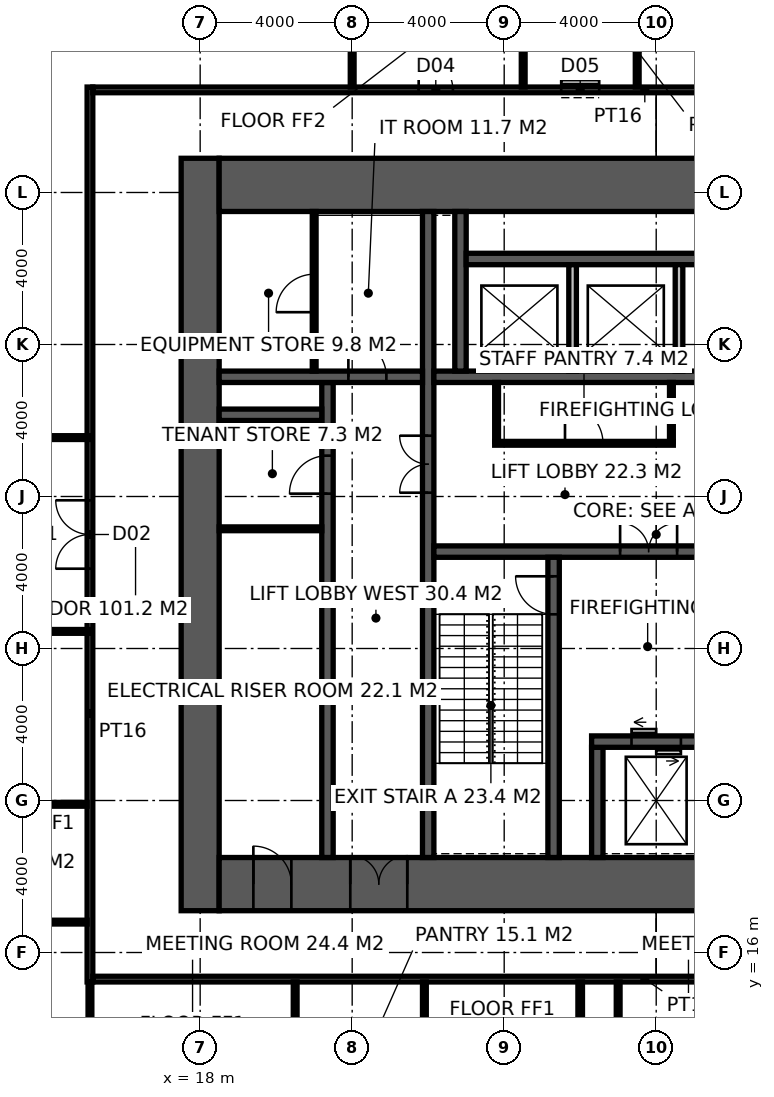
"""IFC4 building model, lengths in metres.
Left out: names, types, materials, properties, quantities, classifications, styles, units other than length and angle.
Written with IfcOpenShell. Run it as: python <this file> out.ifc"""

import sys

from ifc_helpers import new_model, si_unit, direction, frame, frame_2d, origin, place, context, subcontext, project, spatial, rectangle, extrude, element, fill, save


model = new_model("IFC4")
c1 = context("Model", 3, precision=1e-05, world=origin(), true_north=direction((0.0, 1.0)))
c2 = subcontext(c1, "Body", "Model", "MODEL_VIEW")
j1 = project(units=[si_unit("LENGTHUNIT", "METRE"), si_unit("PLANEANGLEUNIT", "RADIAN")], contexts=[c1])
p1 = place(None, origin())
s1 = spatial("IfcSite", under=j1, at=p1, CompositionType="ELEMENT")
p2 = place(p1, origin())
s2 = spatial("IfcBuilding", under=s1, at=p2, CompositionType="ELEMENT")
p3 = place(p2, frame((0.0, 0.0, 6.0)))
s3 = spatial("IfcBuildingStorey", under=s2, at=p3, CompositionType="ELEMENT", Elevation=6.0)
p4 = place(p3, frame((18.0, 17.1, -0.15), z_axis=(0.0, 0.0, 1.0), x_axis=(0.0, 1.0, 0.0)))
e1 = element("IfcWall", 1, at=p4, inside=s3, PredefinedType="SHEAR", context=c2, shape_type="SweptSolid", body=[
    extrude(rectangle(XDim=19.8, YDim=1.0, at=frame_2d((9.9, 0.0))), origin(), (0.0, 0.0, 1.0), 5.0),
])
p5 = place(p3, frame((18.5, 17.8, -0.15), z_axis=(0.0, 0.0, 1.0), x_axis=(1.0, 0.0, 0.0)))
e2 = element("IfcWall", 2, at=p5, inside=s3, PredefinedType="SHEAR", context=c2, shape_type="SweptSolid", body=[
    extrude(rectangle(XDim=23.0, YDim=1.4, at=frame_2d((11.5, 0.0))), origin(), (0.0, 0.0, 1.0), 5.0),
])
p6 = place(p5, frame((3.45, 0.0, 0.15)))
e3 = element("IfcOpeningElement", 3, at=p6, cuts=e2, PredefinedType="OPENING", context=c2, shape_type="SweptSolid", body=[
    extrude(rectangle(XDim=1.5, YDim=2.4, at=frame_2d((0.75, 1.2))), frame((0.0, 0.71, 0.0), z_axis=(0.0, -1.0, 0.0), x_axis=(1.0, 0.0, 0.0)), (0.0, 0.0, 1.0), 1.42),
])
p7 = place(p5, frame((17.9, 0.0, 0.15)))
e4 = element("IfcOpeningElement", 4, at=p7, cuts=e2, PredefinedType="OPENING", context=c2, shape_type="SweptSolid", body=[
    extrude(rectangle(XDim=1.5, YDim=2.4, at=frame_2d((0.75, 1.2))), frame((0.0, 0.71, 0.0), z_axis=(0.0, -1.0, 0.0), x_axis=(1.0, 0.0, 0.0)), (0.0, 0.0, 1.0), 1.42),
])
p8 = place(p5, frame((0.9, 0.0, 0.15)))
e5 = element("IfcOpeningElement", 5, at=p8, cuts=e2, PredefinedType="OPENING", context=c2, shape_type="SweptSolid", body=[
    extrude(rectangle(XDim=1.0, YDim=2.2, at=frame_2d((0.5, 1.1))), frame((0.0, 0.71, 0.0), z_axis=(0.0, -1.0, 0.0), x_axis=(1.0, 0.0, 0.0)), (0.0, 0.0, 1.0), 1.42),
])
p9 = place(p3, frame((18.5, 36.2, -0.15), z_axis=(0.0, 0.0, 1.0), x_axis=(1.0, 0.0, 0.0)))
e6 = element("IfcWall", 6, at=p9, inside=s3, PredefinedType="SHEAR", context=c2, shape_type="SweptSolid", body=[
    extrude(rectangle(XDim=23.0, YDim=1.4, at=frame_2d((11.5, 0.0))), origin(), (0.0, 0.0, 1.0), 5.0),
])
p10 = place(p3, frame((24.0, 18.5, -0.15), z_axis=(0.0, 0.0, 1.0), x_axis=(0.0, 1.0, 0.0)))
e7 = element("IfcWall", 7, at=p10, inside=s3, PredefinedType="SHEAR", context=c2, shape_type="SweptSolid", body=[
    extrude(rectangle(XDim=17.0, YDim=0.3, at=frame_2d((8.5, 0.0))), origin(), (0.0, 0.0, 1.0), 5.0),
])
p11 = place(p10, frame((9.6, 0.0, 0.15)))
e8 = element("IfcOpeningElement", 8, at=p11, cuts=e7, PredefinedType="OPENING", context=c2, shape_type="SweptSolid", body=[
    extrude(rectangle(XDim=1.5, YDim=2.4, at=frame_2d((0.75, 1.2))), frame((0.0, 0.16, 0.0), z_axis=(0.0, -1.0, 0.0), x_axis=(1.0, 0.0, 0.0)), (0.0, 0.0, 1.0), 0.32),
])
p12 = place(p3, frame((24.15, 26.55, -0.15), z_axis=(0.0, 0.0, 1.0), x_axis=(1.0, 0.0, 0.0)))
e9 = element("IfcWall", 9, at=p12, inside=s3, PredefinedType="SHEAR", context=c2, shape_type="SweptSolid", body=[
    extrude(rectangle(XDim=11.25, YDim=0.3, at=frame_2d((5.625, 0.0))), origin(), (0.0, 0.0, 1.0), 5.0),
])
p13 = place(p12, frame((9.25, 0.0, 0.15)))
e10 = element("IfcOpeningElement", 10, at=p13, cuts=e9, PredefinedType="OPENING", context=c2, shape_type="SweptSolid", body=[
    extrude(rectangle(XDim=1.0, YDim=2.2, at=frame_2d((0.5, 1.1))), frame((0.0, 0.16, 0.0), z_axis=(0.0, -1.0, 0.0), x_axis=(1.0, 0.0, 0.0)), (0.0, 0.0, 1.0), 0.32),
])
p14 = place(p12, frame((4.9, 0.0, 0.15)))
e11 = element("IfcOpeningElement", 11, at=p14, cuts=e9, PredefinedType="OPENING", context=c2, shape_type="SweptSolid", body=[
    extrude(rectangle(XDim=1.5, YDim=2.4, at=frame_2d((0.75, 1.2))), frame((0.0, 0.16, 0.0), z_axis=(0.0, -1.0, 0.0), x_axis=(1.0, 0.0, 0.0)), (0.0, 0.0, 1.0), 0.32),
])
p15 = place(p3, frame((27.3, 18.5, -0.15), z_axis=(0.0, 0.0, 1.0), x_axis=(0.0, 1.0, 0.0)))
e12 = element("IfcWall", 12, at=p15, inside=s3, PredefinedType="SHEAR", context=c2, shape_type="SweptSolid", body=[
    extrude(rectangle(XDim=7.9, YDim=0.3, at=frame_2d((3.95, 0.0))), origin(), (0.0, 0.0, 1.0), 5.0),
])
p16 = place(p15, frame((6.4, 0.0, 0.15)))
e13 = element("IfcOpeningElement", 13, at=p16, cuts=e12, PredefinedType="OPENING", context=c2, shape_type="SweptSolid", body=[
    extrude(rectangle(XDim=1.0, YDim=2.2, at=frame_2d((0.5, 1.1))), frame((0.0, 0.16, 0.0), z_axis=(0.0, -1.0, 0.0), x_axis=(1.0, 0.0, 0.0)), (0.0, 0.0, 1.0), 0.32),
])
p17 = place(p3, frame((28.45, 18.5, -0.15), z_axis=(0.0, 0.0, 1.0), x_axis=(0.0, 1.0, 0.0)))
e14 = element("IfcWall", 14, at=p17, inside=s3, PredefinedType="SHEAR", context=c2, shape_type="SweptSolid", body=[
    extrude(rectangle(XDim=2.9, YDim=0.3, at=frame_2d((1.45, 0.0))), origin(), (0.0, 0.0, 1.0), 5.0),
])
p18 = place(p3, frame((28.3, 21.55, -0.15), z_axis=(0.0, 0.0, 1.0), x_axis=(1.0, 0.0, 0.0)))
e15 = element("IfcWall", 15, at=p18, inside=s3, PredefinedType="SHEAR", context=c2, shape_type="SweptSolid", body=[
    extrude(rectangle(XDim=3.8, YDim=0.3, at=frame_2d((1.9, 0.0))), origin(), (0.0, 0.0, 1.0), 5.0),
])
p19 = place(p18, frame((1.05, 0.0, 0.15)))
e16 = element("IfcOpeningElement", 16, at=p19, cuts=e15, PredefinedType="OPENING", context=c2, shape_type="SweptSolid", body=[
    extrude(rectangle(XDim=1.3, YDim=2.4, at=frame_2d((0.65, 1.2))), frame((0.0, 0.16, 0.0), z_axis=(0.0, -1.0, 0.0), x_axis=(1.0, 0.0, 0.0)), (0.0, 0.0, 1.0), 0.32),
])
p20 = place(p3, frame((24.15, 31.15, -0.15), z_axis=(0.0, 0.0, 1.0), x_axis=(1.0, 0.0, 0.0)))
e17 = element("IfcWall", 17, at=p20, inside=s3, PredefinedType="SHEAR", context=c2, shape_type="SweptSolid", body=[
    extrude(rectangle(XDim=11.25, YDim=0.3, at=frame_2d((5.625, 0.0))), origin(), (0.0, 0.0, 1.0), 5.0),
])
p21 = place(p20, frame((7.25, 0.0, 0.15)))
e18 = element("IfcOpeningElement", 18, at=p21, cuts=e17, PredefinedType="OPENING", context=c2, shape_type="SweptSolid", body=[
    extrude(rectangle(XDim=1.4, YDim=2.4, at=frame_2d((0.7, 1.2))), frame((0.0, 0.16, 0.0), z_axis=(0.0, -1.0, 0.0), x_axis=(1.0, 0.0, 0.0)), (0.0, 0.0, 1.0), 0.32),
])
p22 = place(p3, frame((21.35, 18.5, -0.15), z_axis=(0.0, 0.0, 1.0), x_axis=(0.0, 1.0, 0.0)))
e19 = element("IfcWall", 19, at=p22, inside=s3, PredefinedType="SHEAR", context=c2, shape_type="SweptSolid", body=[
    extrude(rectangle(XDim=12.5, YDim=0.3, at=frame_2d((6.25, 0.0))), origin(), (0.0, 0.0, 1.0), 5.0),
])
p23 = place(p22, frame((9.575, 0.0, 0.15)))
e20 = element("IfcOpeningElement", 20, at=p23, cuts=e19, PredefinedType="OPENING", context=c2, shape_type="SweptSolid", body=[
    extrude(rectangle(XDim=1.0, YDim=2.2, at=frame_2d((0.5, 1.1))), frame((0.0, 0.16, 0.0), z_axis=(0.0, -1.0, 0.0), x_axis=(1.0, 0.0, 0.0)), (0.0, 0.0, 1.0), 0.32),
])
p24 = place(p3, frame((18.5, 31.15, -0.15), z_axis=(0.0, 0.0, 1.0), x_axis=(1.0, 0.0, 0.0)))
e21 = element("IfcWall", 21, at=p24, inside=s3, PredefinedType="SHEAR", context=c2, shape_type="SweptSolid", body=[
    extrude(rectangle(XDim=5.35, YDim=0.3, at=frame_2d((2.675, 0.0))), origin(), (0.0, 0.0, 1.0), 5.0),
])
p25 = place(p24, frame((3.4, 0.0, 0.15)))
e22 = element("IfcOpeningElement", 22, at=p25, cuts=e21, PredefinedType="OPENING", context=c2, shape_type="SweptSolid", body=[
    extrude(rectangle(XDim=1.0, YDim=2.2, at=frame_2d((0.5, 1.1))), frame((0.0, 0.16, 0.0), z_axis=(0.0, -1.0, 0.0), x_axis=(1.0, 0.0, 0.0)), (0.0, 0.0, 1.0), 0.32),
])
p26 = place(p3, frame((18.5, 30.15, -0.15), z_axis=(0.0, 0.0, 1.0), x_axis=(1.0, 0.0, 0.0)))
e23 = element("IfcWall", 23, at=p26, inside=s3, PredefinedType="SHEAR", context=c2, shape_type="SweptSolid", body=[
    extrude(rectangle(XDim=2.7, YDim=0.3, at=frame_2d((1.35, 0.0))), origin(), (0.0, 0.0, 1.0), 5.0),
])
p27 = place(p3, frame((24.85, 31.3, -0.15), z_axis=(0.0, 0.0, 1.0), x_axis=(0.0, 1.0, 0.0)))
e24 = element("IfcWall", 24, at=p27, inside=s3, PredefinedType="SHEAR", context=c2, shape_type="SweptSolid", body=[
    extrude(rectangle(XDim=4.2, YDim=0.3, at=frame_2d((2.1, 0.0))), origin(), (0.0, 0.0, 1.0), 5.0),
])
p28 = place(p3, frame((25.0, 34.25, -0.15), z_axis=(0.0, 0.0, 1.0), x_axis=(1.0, 0.0, 0.0)))
e25 = element("IfcWall", 25, at=p28, inside=s3, PredefinedType="SHEAR", context=c2, shape_type="SweptSolid", body=[
    extrude(rectangle(XDim=8.6, YDim=0.3, at=frame_2d((4.3, 0.0))), origin(), (0.0, 0.0, 1.0), 5.0),
])
for number, where, z_axis, x_axis in (
    (26, (27.8, 31.3, -0.15), (0.0, 0.0, 1.0), (0.0, 1.0, 0.0)),
    (27, (30.6, 31.3, -0.15), (0.0, 0.0, 1.0), (0.0, 1.0, 0.0)),
):
    element("IfcWall", number, at=place(p3, frame(where, z_axis=z_axis, x_axis=x_axis)), inside=s3, PredefinedType="SOLIDWALL", context=c2, shape_type="SweptSolid", body=[
        extrude(rectangle(XDim=2.8, YDim=0.2, at=frame_2d((1.4, 0.0))), origin(), (0.0, 0.0, 1.0), 5.0),
    ])
p29 = place(p3, frame((21.0, 31.3, 0.0), z_axis=(0.0, 0.0, 1.0), x_axis=(0.0, 1.0, 0.0)))
e28 = element("IfcWall", 28, at=p29, inside=s3, PredefinedType="PARTITIONING", context=c2, shape_type="SweptSolid", body=[
    extrude(rectangle(XDim=4.2, YDim=0.1, at=frame_2d((2.1, 0.0))), origin(), (0.0, 0.0, 1.0), 4.85),
])
p30 = place(p29, frame((1.55, 0.0, 0.0)))
e29 = element("IfcOpeningElement", 29, at=p30, cuts=e28, PredefinedType="OPENING", context=c2, shape_type="SweptSolid", body=[
    extrude(rectangle(XDim=1.0, YDim=2.2, at=frame_2d((0.5, 1.1))), frame((0.0, 0.06, 0.0), z_axis=(0.0, -1.0, 0.0), x_axis=(1.0, 0.0, 0.0)), (0.0, 0.0, 1.0), 0.12),
])
p31 = place(p3, frame((25.75, 29.4, 0.0), z_axis=(0.0, 0.0, 1.0), x_axis=(1.0, 0.0, 0.0)))
e30 = element("IfcWall", 30, at=p31, inside=s3, PredefinedType="PARTITIONING", context=c2, shape_type="SweptSolid", body=[
    extrude(rectangle(XDim=4.7, YDim=0.1, at=frame_2d((2.35, 0.0))), origin(), (0.0, 0.0, 1.0), 4.85),
])
p32 = place(p31, frame((1.85, 0.0, 0.0)))
e31 = element("IfcOpeningElement", 31, at=p32, cuts=e30, PredefinedType="OPENING", context=c2, shape_type="SweptSolid", body=[
    extrude(rectangle(XDim=1.0, YDim=2.2, at=frame_2d((0.5, 1.1))), frame((0.0, 0.06, 0.0), z_axis=(0.0, -1.0, 0.0), x_axis=(1.0, 0.0, 0.0)), (0.0, 0.0, 1.0), 0.12),
])
for number, where, z_axis, x_axis in (
    (32, (25.8, 29.45, 0.0), (0.0, 0.0, 1.0), (0.0, 1.0, 0.0)),
    (33, (30.4, 29.45, 0.0), (0.0, 0.0, 1.0), (0.0, 1.0, 0.0)),
):
    element("IfcWall", number, at=place(p3, frame(where, z_axis=z_axis, x_axis=x_axis)), inside=s3, PredefinedType="PARTITIONING", context=c2, shape_type="SweptSolid", body=[
        extrude(rectangle(XDim=1.55, YDim=0.1, at=frame_2d((0.775, 0.0))), origin(), (0.0, 0.0, 1.0), 4.85),
    ])
p33 = place(p3, frame((18.5, 27.15, 0.0), z_axis=(0.0, 0.0, 1.0), x_axis=(1.0, 0.0, 0.0)))
e34 = element("IfcWall", 34, at=p33, inside=s3, PredefinedType="PARTITIONING", context=c2, shape_type="SweptSolid", body=[
    extrude(rectangle(XDim=2.7, YDim=0.1, at=frame_2d((1.35, 0.0))), origin(), (0.0, 0.0, 1.0), 4.85),
])
p34 = place(p3, frame((15.1, 15.225, 0.0), z_axis=(0.0, 0.0, 1.0), x_axis=(0.0, 1.0, 0.0)))
e35 = element("IfcWall", 35, at=p34, inside=s3, PredefinedType="PARTITIONING", context=c2, shape_type="SweptSolid", body=[
    extrude(rectangle(XDim=23.55, YDim=0.15, at=frame_2d((11.775, 0.0))), origin(), (0.0, 0.0, 1.0), 4.85),
])
p35 = place(p34, frame((10.875, 0.0, 0.0)))
e36 = element("IfcOpeningElement", 36, at=p35, cuts=e35, PredefinedType="OPENING", context=c2, shape_type="SweptSolid", body=[
    extrude(rectangle(XDim=1.8, YDim=2.4, at=frame_2d((0.9, 1.2))), frame((0.0, 0.085, 0.0), z_axis=(0.0, -1.0, 0.0), x_axis=(1.0, 0.0, 0.0)), (0.0, 0.0, 1.0), 0.17),
])
p36 = place(p3, frame((15.175, 15.3, 0.0), z_axis=(0.0, 0.0, 1.0), x_axis=(1.0, 0.0, 0.0)))
e37 = element("IfcWall", 37, at=p36, inside=s3, PredefinedType="PARTITIONING", context=c2, shape_type="SweptSolid", body=[
    extrude(rectangle(XDim=29.05, YDim=0.15, at=frame_2d((14.525, 0.0))), origin(), (0.0, 0.0, 1.0), 4.85),
])
p37 = place(p3, frame((15.175, 38.7, 0.0), z_axis=(0.0, 0.0, 1.0), x_axis=(1.0, 0.0, 0.0)))
e38 = element("IfcWall", 38, at=p37, inside=s3, PredefinedType="PARTITIONING", context=c2, shape_type="SweptSolid", body=[
    extrude(rectangle(XDim=29.05, YDim=0.15, at=frame_2d((14.525, 0.0))), origin(), (0.0, 0.0, 1.0), 4.85),
])
p38 = place(p37, frame((8.575, 0.0, 0.0)))
e39 = element("IfcOpeningElement", 39, at=p38, cuts=e38, PredefinedType="OPENING", context=c2, shape_type="SweptSolid", body=[
    extrude(rectangle(XDim=0.9, YDim=2.1, at=frame_2d((0.45, 1.05))), frame((0.0, 0.085, 0.0), z_axis=(0.0, -1.0, 0.0), x_axis=(1.0, 0.0, 0.0)), (0.0, 0.0, 1.0), 0.17),
])
p39 = place(p37, frame((12.325, 0.0, 0.0)))
e40 = element("IfcOpeningElement", 40, at=p39, cuts=e38, PredefinedType="OPENING", context=c2, shape_type="SweptSolid", body=[
    extrude(rectangle(XDim=1.0, YDim=2.1, at=frame_2d((0.5, 1.05))), frame((0.0, 0.085, 0.0), z_axis=(0.0, -1.0, 0.0), x_axis=(1.0, 0.0, 0.0)), (0.0, 0.0, 1.0), 0.17),
])
p40 = place(p37, frame((16.175, 0.0, 0.0)))
e41 = element("IfcOpeningElement", 41, at=p40, cuts=e38, PredefinedType="OPENING", context=c2, shape_type="SweptSolid", body=[
    extrude(rectangle(XDim=0.9, YDim=2.1, at=frame_2d((0.45, 1.05))), frame((0.0, 0.085, 0.0), z_axis=(0.0, -1.0, 0.0), x_axis=(1.0, 0.0, 0.0)), (0.0, 0.0, 1.0), 0.17),
])
p41 = place(p3, frame((22.0, 38.775, 0.0), z_axis=(0.0, 0.0, 1.0), x_axis=(0.0, 1.0, 0.0)))
e42 = element("IfcWall", 42, at=p41, inside=s3, PredefinedType="PARTITIONING", context=c2, shape_type="SweptSolid", body=[
    extrude(rectangle(XDim=3.275, YDim=0.1, at=frame_2d((1.638, 0.0))), origin(), (0.0, 0.0, 1.0), 3.65),
])
for number, where, z_axis, x_axis in (
    (43, (26.5, 38.775, 0.0), (0.0, 0.0, 1.0), (0.0, 1.0, 0.0)),
    (44, (29.5, 38.775, 0.0), (0.0, 0.0, 1.0), (0.0, 1.0, 0.0)),
):
    element("IfcWall", number, at=place(p3, frame(where, z_axis=z_axis, x_axis=x_axis)), inside=s3, PredefinedType="PARTITIONING", context=c2, shape_type="SweptSolid", body=[
        extrude(rectangle(XDim=3.175, YDim=0.1, at=frame_2d((1.587, 0.0))), origin(), (0.0, 0.0, 1.0), 3.65),
    ])
p42 = place(p3, frame((28.0, -3.7, 0.0), z_axis=(0.0, 0.0, 1.0), x_axis=(0.0, 1.0, 0.0)))
e45 = element("IfcWall", 45, at=p42, inside=s3, PredefinedType="PARTITIONING", context=c2, shape_type="SweptSolid", body=[
    extrude(rectangle(XDim=18.925, YDim=0.12, at=frame_2d((9.462, 0.0))), origin(), (0.0, 0.0, 1.0), 4.85),
])
p43 = place(p3, frame((10.25, 16.8, 0.0), z_axis=(0.0, 0.0, 1.0), x_axis=(1.0, 0.0, 0.0)))
e46 = element("IfcWall", 46, at=p43, inside=s3, PredefinedType="PARTITIONING", context=c2, shape_type="SweptSolid", body=[
    extrude(rectangle(XDim=4.775, YDim=0.1, at=frame_2d((2.387, 0.0))), origin(), (0.0, 0.0, 1.0), 4.85),
])
p44 = place(p3, frame((10.25, 19.9, 0.0), z_axis=(0.0, 0.0, 1.0), x_axis=(1.0, 0.0, 0.0)))
e47 = element("IfcWall", 47, at=p44, inside=s3, PredefinedType="PARTITIONING", context=c2, shape_type="SweptSolid", body=[
    extrude(rectangle(XDim=4.775, YDim=0.1, at=frame_2d((2.387, 0.0))), origin(), (0.0, 0.0, 1.0), 3.65),
])
for number, where, z_axis, x_axis in (
    (48, (15.1, 10.55, 0.0), (0.0, 0.0, 1.0), (0.0, 1.0, 0.0)),
    (49, (20.5, 10.55, 0.0), (0.0, 0.0, 1.0), (0.0, 1.0, 0.0)),
    (50, (23.9, 10.55, 0.0), (0.0, 0.0, 1.0), (0.0, 1.0, 0.0)),
    (51, (28.999, 10.55, 0.0), (0.0, 0.0, 1.0), (0.0, 1.0, 0.0)),
):
    element("IfcWall", number, at=place(p3, frame(where, z_axis=z_axis, x_axis=x_axis)), inside=s3, PredefinedType="PARTITIONING", context=c2, shape_type="SweptSolid", body=[
        extrude(rectangle(XDim=4.675, YDim=0.1, at=frame_2d((2.337, 0.0))), origin(), (0.0, 0.0, 1.0), 4.85),
    ])
p45 = place(p3, frame((15.1, 29.55, 0.0), z_axis=(0.0, 0.0, 1.0), x_axis=(-1.0, 0.0, 0.0)))
e52 = element("IfcWall", 52, at=p45, inside=s3, PredefinedType="PARTITIONING", context=c2, shape_type="SweptSolid", body=[
    extrude(rectangle(XDim=4.5, YDim=0.1, at=frame_2d((2.25, 0.0))), origin(), (0.0, 0.0, 1.0), 4.85),
])
p46 = place(p3, frame((10.6, 24.45, 0.0), z_axis=(0.0, 0.0, 1.0), x_axis=(1.0, 0.0, 0.0)))
e53 = element("IfcWall", 53, at=p46, inside=s3, PredefinedType="PARTITIONING", context=c2, shape_type="SweptSolid", body=[
    extrude(rectangle(XDim=4.5, YDim=0.1, at=frame_2d((2.25, 0.0))), origin(), (0.0, 0.0, 1.0), 3.65),
])
p47 = place(p16, origin())
e54 = element("IfcDoor", 54, at=p47, inside=s3, OperationType="SINGLE_SWING_RIGHT", PredefinedType="DOOR", context=c2, shape_type="SweptSolid", body=[
    extrude(rectangle(XDim=1.0, YDim=2.2, at=frame_2d((0.5, 1.1))), frame((0.0, 0.025, 0.0), z_axis=(0.0, -1.0, 0.0), x_axis=(1.0, 0.0, 0.0)), (0.0, 0.0, 1.0), 0.05),
])
fill(e13, e54)
p48 = place(p14, origin())
e55 = element("IfcDoor", 55, at=p48, inside=s3, OperationType="DOUBLE_DOOR_DOUBLE_SWING", PredefinedType="DOOR", context=c2, shape_type="SweptSolid", body=[
    extrude(rectangle(XDim=1.5, YDim=2.4, at=frame_2d((0.75, 1.2))), frame((0.0, 0.025, 0.0), z_axis=(0.0, -1.0, 0.0), x_axis=(1.0, 0.0, 0.0)), (0.0, 0.0, 1.0), 0.05),
])
fill(e11, e55)
p49 = place(p11, origin())
e56 = element("IfcDoor", 56, at=p49, inside=s3, OperationType="DOUBLE_DOOR_DOUBLE_SWING", PredefinedType="DOOR", context=c2, shape_type="SweptSolid", body=[
    extrude(rectangle(XDim=1.5, YDim=2.4, at=frame_2d((0.75, 1.2))), frame((0.0, 0.025, 0.0), z_axis=(0.0, -1.0, 0.0), x_axis=(1.0, 0.0, 0.0)), (0.0, 0.0, 1.0), 0.05),
])
fill(e8, e56)
p50 = place(p25, origin())
e57 = element("IfcDoor", 57, at=p50, inside=s3, OperationType="SINGLE_SWING_LEFT", PredefinedType="DOOR", context=c2, shape_type="SweptSolid", body=[
    extrude(rectangle(XDim=1.0, YDim=2.2, at=frame_2d((0.5, 1.1))), frame((0.0, 0.025, 0.0), z_axis=(0.0, -1.0, 0.0), x_axis=(1.0, 0.0, 0.0)), (0.0, 0.0, 1.0), 0.05),
])
fill(e22, e57)
p51 = place(p30, origin())
e58 = element("IfcDoor", 58, at=p51, inside=s3, OperationType="SINGLE_SWING_LEFT", PredefinedType="DOOR", context=c2, shape_type="SweptSolid", body=[
    extrude(rectangle(XDim=1.0, YDim=2.2, at=frame_2d((0.5, 1.1))), frame((0.0, 0.025, 0.0), z_axis=(0.0, -1.0, 0.0), x_axis=(1.0, 0.0, 0.0)), (0.0, 0.0, 1.0), 0.05),
])
fill(e29, e58)
p52 = place(p32, origin())
e59 = element("IfcDoor", 59, at=p52, inside=s3, OperationType="SINGLE_SWING_LEFT", PredefinedType="DOOR", context=c2, shape_type="SweptSolid", body=[
    extrude(rectangle(XDim=1.0, YDim=2.2, at=frame_2d((0.5, 1.1))), frame((0.0, 0.025, 0.0), z_axis=(0.0, -1.0, 0.0), x_axis=(1.0, 0.0, 0.0)), (0.0, 0.0, 1.0), 0.05),
])
fill(e31, e59)
p53 = place(p23, origin())
e60 = element("IfcDoor", 60, at=p53, inside=s3, OperationType="SINGLE_SWING_LEFT", PredefinedType="DOOR", context=c2, shape_type="SweptSolid", body=[
    extrude(rectangle(XDim=1.0, YDim=2.2, at=frame_2d((0.5, 1.1))), frame((0.0, 0.025, 0.0), z_axis=(0.0, -1.0, 0.0), x_axis=(1.0, 0.0, 0.0)), (0.0, 0.0, 1.0), 0.05),
])
fill(e20, e60)
p54 = place(p6, origin())
e61 = element("IfcDoor", 61, at=p54, inside=s3, OperationType="DOUBLE_DOOR_DOUBLE_SWING", PredefinedType="DOOR", context=c2, shape_type="SweptSolid", body=[
    extrude(rectangle(XDim=1.5, YDim=2.4, at=frame_2d((0.75, 1.2))), frame((0.0, 0.025, 0.0), z_axis=(0.0, -1.0, 0.0), x_axis=(1.0, 0.0, 0.0)), (0.0, 0.0, 1.0), 0.05),
])
fill(e3, e61)
p55 = place(p8, origin())
e62 = element("IfcDoor", 62, at=p55, inside=s3, OperationType="SINGLE_SWING_LEFT", PredefinedType="DOOR", context=c2, shape_type="SweptSolid", body=[
    extrude(rectangle(XDim=1.0, YDim=2.2, at=frame_2d((0.5, 1.1))), frame((0.0, 0.025, 0.0), z_axis=(0.0, -1.0, 0.0), x_axis=(1.0, 0.0, 0.0)), (0.0, 0.0, 1.0), 0.05),
])
fill(e5, e62)
p56 = place(p38, origin())
e63 = element("IfcDoor", 63, at=p56, inside=s3, OperationType="SINGLE_SWING_LEFT", PredefinedType="DOOR", context=c2, shape_type="SweptSolid", body=[
    extrude(rectangle(XDim=0.9, YDim=2.1, at=frame_2d((0.45, 1.05))), frame((0.0, 0.025, 0.0), z_axis=(0.0, -1.0, 0.0), x_axis=(1.0, 0.0, 0.0)), (0.0, 0.0, 1.0), 0.05),
])
fill(e39, e63)
p57 = place(p39, origin())
e64 = element("IfcDoor", 64, at=p57, inside=s3, OperationType="SLIDING_TO_LEFT", PredefinedType="DOOR", context=c2, shape_type="SweptSolid", body=[
    extrude(rectangle(XDim=1.0, YDim=2.1, at=frame_2d((0.5, 1.05))), frame((0.0, 0.025, 0.0), z_axis=(0.0, -1.0, 0.0), x_axis=(1.0, 0.0, 0.0)), (0.0, 0.0, 1.0), 0.05),
])
fill(e40, e64)
p58 = place(p35, origin())
e65 = element("IfcDoor", 65, at=p58, inside=s3, OperationType="DOUBLE_DOOR_DOUBLE_SWING", PredefinedType="DOOR", context=c2, shape_type="SweptSolid", body=[
    extrude(rectangle(XDim=1.8, YDim=2.4, at=frame_2d((0.9, 1.2))), frame((0.0, 0.025, 0.0), z_axis=(0.0, -1.0, 0.0), x_axis=(1.0, 0.0, 0.0)), (0.0, 0.0, 1.0), 0.05),
])
fill(e36, e65)
p59 = place(p19, origin())
e66 = element("IfcDoor", 66, at=p59, inside=s3, OperationType="DOUBLE_DOOR_SLIDING", PredefinedType="DOOR", context=c2, shape_type="SweptSolid", body=[
    extrude(rectangle(XDim=1.3, YDim=2.4, at=frame_2d((0.65, 1.2))), frame((0.0, 0.025, 0.0), z_axis=(0.0, -1.0, 0.0), x_axis=(1.0, 0.0, 0.0)), (0.0, 0.0, 1.0), 0.05),
])
fill(e16, e66)
save(model, sys.argv[1])
